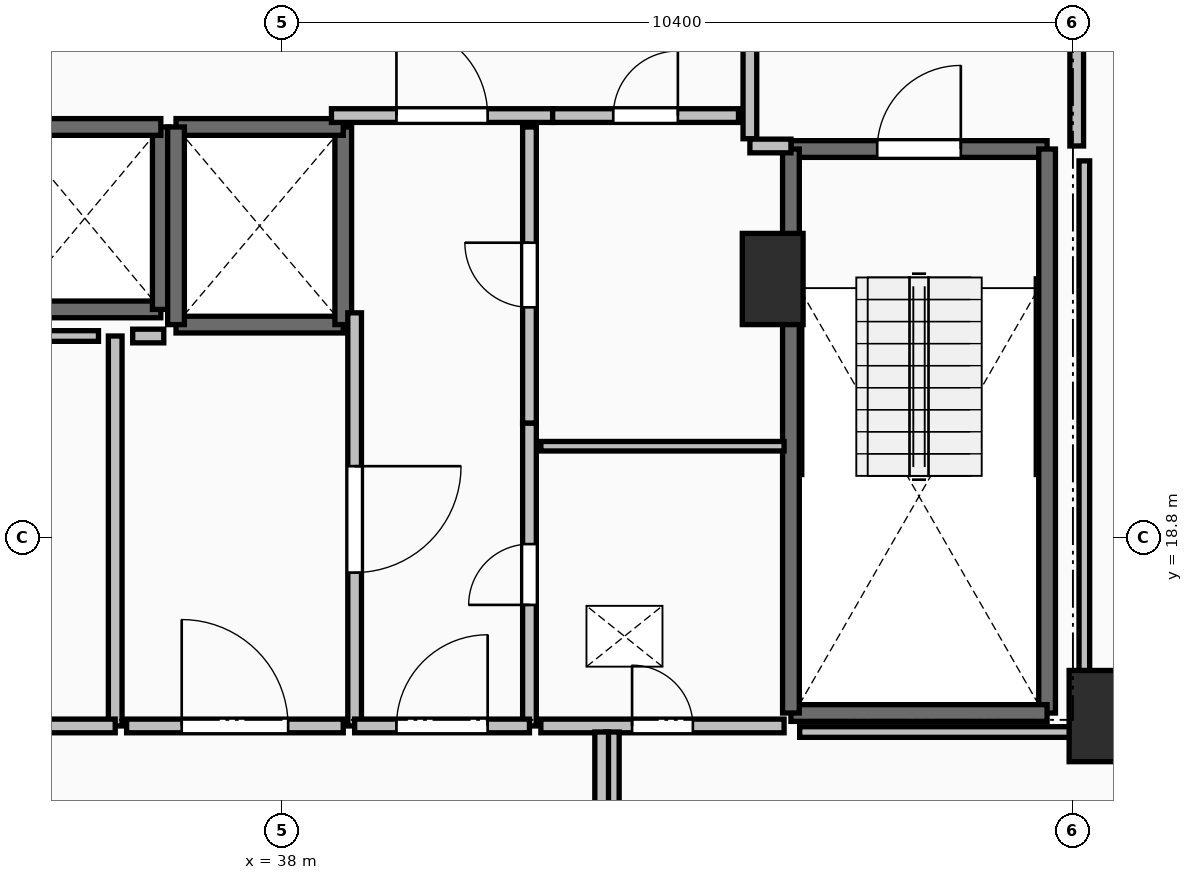
"""IFC4 building model, lengths in metres.
Left out: names, types, materials, properties, quantities, classifications, styles, units other than length and angle.
Written with IfcOpenShell. Run it as: python <this file> out.ifc"""

import sys

from ifc_helpers import new_model, si_unit, direction, frame, frame_2d, origin, origin_2d, place, context, subcontext, project, spatial, rectangle, extrude, element, fill, save


model = new_model("IFC4")
c1 = context("Model", 3, precision=1e-05, world=origin(), true_north=direction((0.0, 1.0)))
c2 = subcontext(c1, "Body", "Model", "MODEL_VIEW")
j1 = project(units=[si_unit("LENGTHUNIT", "METRE"), si_unit("PLANEANGLEUNIT", "RADIAN")], contexts=[c1])
p1 = place(None, origin())
s1 = spatial("IfcSite", under=j1, at=p1, CompositionType="ELEMENT")
p2 = place(p1, origin())
s2 = spatial("IfcBuilding", under=s1, at=p2, CompositionType="ELEMENT")
p3 = place(p2, frame((0.0, 0.0, 24.0)))
s3 = spatial("IfcBuildingStorey", under=s2, at=p3, CompositionType="ELEMENT", Elevation=24.0)
for number, where, z_axis, x_axis in (
    (1, (48.75, 16.45, 0.0), (0.0, 0.0, 1.0), (1.0, 0.0, 0.0)),
    (2, (44.45, 22.2, 0.0), (0.0, 0.0, 1.0), (1.0, 0.0, 0.0)),
):
    element("IfcColumn", number, at=place(p3, frame(where, z_axis=z_axis, x_axis=x_axis)), inside=s3, PredefinedType="PILASTER", context=c2, shape_type="SweptSolid", body=[
        extrude(rectangle(XDim=0.8, YDim=1.2, at=origin_2d()), origin(), (0.0, 0.0, 1.0), 3.5),
    ])
p4 = place(p3, frame((44.69, 23.91, 0.0), z_axis=(0.0, 0.0, 1.0), x_axis=(1.0, 0.0, 0.0)))
e3 = element("IfcWall", 3, at=p4, inside=s3, PredefinedType="SOLIDWALL", context=c2, shape_type="SweptSolid", body=[
    extrude(rectangle(XDim=3.37, YDim=0.22, at=frame_2d((1.685, 0.0))), origin(), (0.0, 0.0, 1.0), 3.24),
])
p5 = place(p4, frame((1.135, 0.0, 0.0)))
e4 = element("IfcOpeningElement", 4, at=p5, cuts=e3, PredefinedType="OPENING", context=c2, shape_type="SweptSolid", body=[
    extrude(rectangle(XDim=1.1, YDim=2.15, at=frame_2d((0.55, 1.075))), frame((0.0, 0.125, 0.0), z_axis=(0.0, -1.0, 0.0), x_axis=(1.0, 0.0, 0.0)), (0.0, 0.0, 1.0), 0.25),
])
p6 = place(p3, frame((48.06, 23.91, 0.0), z_axis=(0.0, 0.0, 1.0), x_axis=(0.0, -1.0, 0.0)))
e5 = element("IfcWall", 5, at=p6, inside=s3, PredefinedType="SOLIDWALL", context=c2, shape_type="SweptSolid", body=[
    extrude(rectangle(XDim=7.42, YDim=0.22, at=frame_2d((3.71, 0.0))), origin(), (0.0, 0.0, 1.0), 3.24),
])
p7 = place(p3, frame((48.06, 16.49, 0.0), z_axis=(0.0, 0.0, 1.0), x_axis=(-1.0, 0.0, 0.0)))
e6 = element("IfcWall", 6, at=p7, inside=s3, PredefinedType="SOLIDWALL", context=c2, shape_type="SweptSolid", body=[
    extrude(rectangle(XDim=3.37, YDim=0.22, at=frame_2d((1.685, 0.0))), origin(), (0.0, 0.0, 1.0), 3.24),
])
p8 = place(p3, frame((44.69, 16.49, 0.0), z_axis=(0.0, 0.0, 1.0), x_axis=(0.0, 1.0, 0.0)))
e7 = element("IfcWall", 7, at=p8, inside=s3, PredefinedType="SOLIDWALL", context=c2, shape_type="SweptSolid", body=[
    extrude(rectangle(XDim=7.42, YDim=0.22, at=frame_2d((3.71, 0.0))), origin(), (0.0, 0.0, 1.0), 3.24),
])
p9 = place(p3, frame((34.4, 21.8, 0.0), z_axis=(0.0, 0.0, 1.0), x_axis=(1.0, 0.0, 0.0)))
e8 = element("IfcWall", 8, at=p9, inside=s3, PredefinedType="SOLIDWALL", context=c2, shape_type="SweptSolid", body=[
    extrude(rectangle(XDim=2.0, YDim=0.22, at=frame_2d((1.0, 0.0))), origin(), (0.0, 0.0, 1.0), 3.24),
])
p10 = place(p3, frame((36.4, 21.8, 0.0), z_axis=(0.0, 0.0, 1.0), x_axis=(0.0, 1.0, 0.0)))
e9 = element("IfcWall", 9, at=p10, inside=s3, PredefinedType="SOLIDWALL", context=c2, shape_type="SweptSolid", body=[
    extrude(rectangle(XDim=2.4, YDim=0.22, at=frame_2d((1.2, 0.0))), origin(), (0.0, 0.0, 1.0), 3.24),
])
p11 = place(p3, frame((36.4, 24.2, 0.0), z_axis=(0.0, 0.0, 1.0), x_axis=(-1.0, 0.0, 0.0)))
e10 = element("IfcWall", 10, at=p11, inside=s3, PredefinedType="SOLIDWALL", context=c2, shape_type="SweptSolid", body=[
    extrude(rectangle(XDim=2.0, YDim=0.22, at=frame_2d((1.0, 0.0))), origin(), (0.0, 0.0, 1.0), 3.24),
])
p12 = place(p3, frame((36.6, 21.6, 0.0), z_axis=(0.0, 0.0, 1.0), x_axis=(1.0, 0.0, 0.0)))
e11 = element("IfcWall", 11, at=p12, inside=s3, PredefinedType="SOLIDWALL", context=c2, shape_type="SweptSolid", body=[
    extrude(rectangle(XDim=2.2, YDim=0.22, at=frame_2d((1.1, 0.0))), origin(), (0.0, 0.0, 1.0), 3.24),
])
p13 = place(p3, frame((38.8, 21.6, 0.0), z_axis=(0.0, 0.0, 1.0), x_axis=(0.0, 1.0, 0.0)))
e12 = element("IfcWall", 12, at=p13, inside=s3, PredefinedType="SOLIDWALL", context=c2, shape_type="SweptSolid", body=[
    extrude(rectangle(XDim=2.6, YDim=0.22, at=frame_2d((1.3, 0.0))), origin(), (0.0, 0.0, 1.0), 3.24),
])
p14 = place(p3, frame((38.8, 24.2, 0.0), z_axis=(0.0, 0.0, 1.0), x_axis=(-1.0, 0.0, 0.0)))
e13 = element("IfcWall", 13, at=p14, inside=s3, PredefinedType="SOLIDWALL", context=c2, shape_type="SweptSolid", body=[
    extrude(rectangle(XDim=2.2, YDim=0.22, at=frame_2d((1.1, 0.0))), origin(), (0.0, 0.0, 1.0), 3.24),
])
p15 = place(p3, frame((36.6, 24.2, 0.0), z_axis=(0.0, 0.0, 1.0), x_axis=(0.0, -1.0, 0.0)))
e14 = element("IfcWall", 14, at=p15, inside=s3, PredefinedType="SOLIDWALL", context=c2, shape_type="SweptSolid", body=[
    extrude(rectangle(XDim=2.6, YDim=0.22, at=frame_2d((1.3, 0.0))), origin(), (0.0, 0.0, 1.0), 3.24),
])
p16 = place(p3, frame((44.15, 27.955, 0.0), z_axis=(0.0, 0.0, 1.0), x_axis=(0.0, -1.0, 0.0)))
e15 = element("IfcWall", 15, at=p16, inside=s3, PredefinedType="PARTITIONING", context=c2, shape_type="SweptSolid", body=[
    extrude(rectangle(XDim=3.91, YDim=0.18, at=frame_2d((1.955, 0.0))), origin(), (0.0, 0.0, 1.0), 3.24),
])
p17 = place(p16, frame((1.355, 0.0, 0.0)))
e16 = element("IfcOpeningElement", 16, at=p17, cuts=e15, PredefinedType="OPENING", context=c2, shape_type="SweptSolid", body=[
    extrude(rectangle(XDim=1.2, YDim=2.15, at=frame_2d((0.6, 1.075))), frame((0.0, 0.105, 0.0), z_axis=(0.0, -1.0, 0.0), x_axis=(1.0, 0.0, 0.0)), (0.0, 0.0, 1.0), 0.21),
])
p18 = place(p3, frame((44.15, 23.95, 0.0), z_axis=(0.0, 0.0, 1.0), x_axis=(1.0, 0.0, 0.0)))
e17 = element("IfcWall", 17, at=p18, inside=s3, PredefinedType="PARTITIONING", context=c2, shape_type="SweptSolid", body=[
    extrude(rectangle(XDim=0.54, YDim=0.18, at=frame_2d((0.27, 0.0))), origin(), (0.0, 0.0, 1.0), 3.24),
])
p19 = place(p3, frame((48.45, 23.95, 0.0), z_axis=(0.0, 0.0, 1.0), x_axis=(0.0, 1.0, 0.0)))
e18 = element("IfcWall", 18, at=p19, inside=s3, PredefinedType="PARTITIONING", context=c2, shape_type="SweptSolid", body=[
    extrude(rectangle(XDim=4.05, YDim=0.18, at=frame_2d((2.025, 0.0))), origin(), (0.0, 0.0, 1.0), 3.24),
])
p20 = place(p19, frame((1.425, 0.0, 0.0)))
e19 = element("IfcOpeningElement", 19, at=p20, cuts=e18, PredefinedType="OPENING", context=c2, shape_type="SweptSolid", body=[
    extrude(rectangle(XDim=1.2, YDim=2.15, at=frame_2d((0.6, 1.075))), frame((0.0, 0.105, 0.0), z_axis=(0.0, -1.0, 0.0), x_axis=(1.0, 0.0, 0.0)), (0.0, 0.0, 1.0), 0.21),
])
p21 = place(p3, frame((38.645, 24.35, 0.0), z_axis=(0.0, 0.0, 1.0), x_axis=(1.0, 0.0, 0.0)))
e20 = element("IfcWall", 20, at=p21, inside=s3, PredefinedType="PARTITIONING", context=c2, shape_type="SweptSolid", body=[
    extrude(rectangle(XDim=2.91, YDim=0.18, at=frame_2d((1.455, 0.0))), origin(), (0.0, 0.0, 1.0), 3.24),
])
p22 = place(p21, frame((0.855, 0.0, 0.0)))
e21 = element("IfcOpeningElement", 21, at=p22, cuts=e20, PredefinedType="OPENING", context=c2, shape_type="SweptSolid", body=[
    extrude(rectangle(XDim=1.2, YDim=2.15, at=frame_2d((0.6, 1.075))), frame((0.0, 0.105, 0.0), z_axis=(0.0, -1.0, 0.0), x_axis=(1.0, 0.0, 0.0)), (0.0, 0.0, 1.0), 0.21),
])
p23 = place(p3, frame((41.555, 24.35, 0.0), z_axis=(0.0, 0.0, 1.0), x_axis=(1.0, 0.0, 0.0)))
e22 = element("IfcWall", 22, at=p23, inside=s3, PredefinedType="PARTITIONING", context=c2, shape_type="SweptSolid", body=[
    extrude(rectangle(XDim=2.445, YDim=0.18, at=frame_2d((1.223, 0.0))), origin(), (0.0, 0.0, 1.0), 3.24),
])
p24 = place(p23, frame((0.798, 0.0, 0.0)))
e23 = element("IfcOpeningElement", 23, at=p24, cuts=e22, PredefinedType="OPENING", context=c2, shape_type="SweptSolid", body=[
    extrude(rectangle(XDim=0.85, YDim=2.1, at=frame_2d((0.425, 1.05))), frame((0.0, 0.105, 0.0), z_axis=(0.0, -1.0, 0.0), x_axis=(1.0, 0.0, 0.0)), (0.0, 0.0, 1.0), 0.21),
])
p25 = place(p3, frame((41.25, 16.32, 0.0), z_axis=(0.0, 0.0, 1.0), x_axis=(0.0, 1.0, 0.0)))
e24 = element("IfcWall", 24, at=p25, inside=s3, PredefinedType="PARTITIONING", context=c2, shape_type="SweptSolid", body=[
    extrude(rectangle(XDim=3.985, YDim=0.18, at=frame_2d((1.992, 0.0))), origin(), (0.0, 0.0, 1.0), 3.24),
])
p26 = place(p25, frame((1.593, 0.0, 0.0)))
e25 = element("IfcOpeningElement", 25, at=p26, cuts=e24, PredefinedType="OPENING", context=c2, shape_type="SweptSolid", body=[
    extrude(rectangle(XDim=0.8, YDim=2.05, at=frame_2d((0.4, 1.025))), frame((0.0, 0.105, 0.0), z_axis=(0.0, -1.0, 0.0), x_axis=(1.0, 0.0, 0.0)), (0.0, 0.0, 1.0), 0.21),
])
p27 = place(p3, frame((41.25, 20.305, 0.0), z_axis=(0.0, 0.0, 1.0), x_axis=(0.0, 1.0, 0.0)))
e26 = element("IfcWall", 26, at=p27, inside=s3, PredefinedType="PARTITIONING", context=c2, shape_type="SweptSolid", body=[
    extrude(rectangle(XDim=3.895, YDim=0.18, at=frame_2d((1.948, 0.0))), origin(), (0.0, 0.0, 1.0), 3.24),
])
p28 = place(p27, frame((1.522, 0.0, 0.0)))
e27 = element("IfcOpeningElement", 27, at=p28, cuts=e26, PredefinedType="OPENING", context=c2, shape_type="SweptSolid", body=[
    extrude(rectangle(XDim=0.85, YDim=2.1, at=frame_2d((0.425, 1.05))), frame((0.0, 0.105, 0.0), z_axis=(0.0, -1.0, 0.0), x_axis=(1.0, 0.0, 0.0)), (0.0, 0.0, 1.0), 0.21),
])
p29 = place(p3, frame((38.95, 21.755, 0.0), z_axis=(0.0, 0.0, 1.0), x_axis=(0.0, -1.0, 0.0)))
e28 = element("IfcWall", 28, at=p29, inside=s3, PredefinedType="PARTITIONING", context=c2, shape_type="SweptSolid", body=[
    extrude(rectangle(XDim=5.435, YDim=0.18, at=frame_2d((2.717, 0.0))), origin(), (0.0, 0.0, 1.0), 3.24),
])
p30 = place(p29, frame((2.018, 0.0, 0.0)))
e29 = element("IfcOpeningElement", 29, at=p30, cuts=e28, PredefinedType="OPENING", context=c2, shape_type="SweptSolid", body=[
    extrude(rectangle(XDim=1.4, YDim=2.2, at=frame_2d((0.7, 1.1))), frame((0.0, 0.105, 0.0), z_axis=(0.0, -1.0, 0.0), x_axis=(1.0, 0.0, 0.0)), (0.0, 0.0, 1.0), 0.21),
])
p31 = place(p3, frame((38.95, 16.32, 0.0), z_axis=(0.0, 0.0, 1.0), x_axis=(1.0, 0.0, 0.0)))
e30 = element("IfcWall", 30, at=p31, inside=s3, PredefinedType="PARTITIONING", context=c2, shape_type="SweptSolid", body=[
    extrude(rectangle(XDim=2.3, YDim=0.18, at=frame_2d((1.15, 0.0))), origin(), (0.0, 0.0, 1.0), 3.24),
])
p32 = place(p31, frame((0.55, 0.0, 0.0)))
e31 = element("IfcOpeningElement", 31, at=p32, cuts=e30, PredefinedType="OPENING", context=c2, shape_type="SweptSolid", body=[
    extrude(rectangle(XDim=1.2, YDim=2.15, at=frame_2d((0.6, 1.075))), frame((0.0, 0.105, 0.0), z_axis=(0.0, -1.0, 0.0), x_axis=(1.0, 0.0, 0.0)), (0.0, 0.0, 1.0), 0.21),
])
p33 = place(p3, frame((44.6, 20.0, 0.0), z_axis=(0.0, 0.0, 1.0), x_axis=(-1.0, 0.0, 0.0)))
e32 = element("IfcWall", 32, at=p33, inside=s3, PredefinedType="PARTITIONING", context=c2, shape_type="SweptSolid", body=[
    extrude(rectangle(XDim=3.2, YDim=0.125, at=frame_2d((1.6, 0.0))), origin(), (0.0, 0.0, 1.0), 3.24),
])
p34 = place(p3, frame((41.4, 16.32, 0.0), z_axis=(0.0, 0.0, 1.0), x_axis=(1.0, 0.0, 0.0)))
e33 = element("IfcWall", 33, at=p34, inside=s3, PredefinedType="PARTITIONING", context=c2, shape_type="SweptSolid", body=[
    extrude(rectangle(XDim=3.2, YDim=0.18, at=frame_2d((1.6, 0.0))), origin(), (0.0, 0.0, 1.0), 3.24),
])
p35 = place(p34, frame((1.2, 0.0, 0.0)))
e34 = element("IfcOpeningElement", 34, at=p35, cuts=e33, PredefinedType="OPENING", context=c2, shape_type="SweptSolid", body=[
    extrude(rectangle(XDim=0.8, YDim=2.05, at=frame_2d((0.4, 1.025))), frame((0.0, 0.105, 0.0), z_axis=(0.0, -1.0, 0.0), x_axis=(1.0, 0.0, 0.0)), (0.0, 0.0, 1.0), 0.21),
])
p36 = place(p3, frame((35.8, 16.32, 0.0), z_axis=(0.0, 0.0, 1.0), x_axis=(0.0, 1.0, 0.0)))
e35 = element("IfcWall", 35, at=p36, inside=s3, PredefinedType="PARTITIONING", context=c2, shape_type="SweptSolid", body=[
    extrude(rectangle(XDim=5.13, YDim=0.18, at=frame_2d((2.565, 0.0))), origin(), (0.0, 0.0, 1.0), 3.24),
])
p37 = place(p3, frame((31.4, 16.32, 0.0), z_axis=(0.0, 0.0, 1.0), x_axis=(1.0, 0.0, 0.0)))
e36 = element("IfcWall", 36, at=p37, inside=s3, PredefinedType="PARTITIONING", context=c2, shape_type="SweptSolid", body=[
    extrude(rectangle(XDim=4.4, YDim=0.18, at=frame_2d((2.2, 0.0))), origin(), (0.0, 0.0, 1.0), 3.24),
])
p38 = place(p37, frame((1.775, 0.0, 0.0)))
e37 = element("IfcOpeningElement", 37, at=p38, cuts=e36, PredefinedType="OPENING", context=c2, shape_type="SweptSolid", body=[
    extrude(rectangle(XDim=0.85, YDim=2.1, at=frame_2d((0.425, 1.05))), frame((0.0, 0.105, 0.0), z_axis=(0.0, -1.0, 0.0), x_axis=(1.0, 0.0, 0.0)), (0.0, 0.0, 1.0), 0.21),
])
p39 = place(p3, frame((35.95, 16.32, 0.0), z_axis=(0.0, 0.0, 1.0), x_axis=(1.0, 0.0, 0.0)))
e38 = element("IfcWall", 38, at=p39, inside=s3, PredefinedType="PARTITIONING", context=c2, shape_type="SweptSolid", body=[
    extrude(rectangle(XDim=2.85, YDim=0.18, at=frame_2d((1.425, 0.0))), origin(), (0.0, 0.0, 1.0), 3.24),
])
p40 = place(p39, frame((0.725, 0.0, 0.0)))
e39 = element("IfcOpeningElement", 39, at=p40, cuts=e38, PredefinedType="OPENING", context=c2, shape_type="SweptSolid", body=[
    extrude(rectangle(XDim=1.4, YDim=2.2, at=frame_2d((0.7, 1.1))), frame((0.0, 0.105, 0.0), z_axis=(0.0, -1.0, 0.0), x_axis=(1.0, 0.0, 0.0)), (0.0, 0.0, 1.0), 0.21),
])
p41 = place(p3, frame((42.34, 16.24, 0.0), z_axis=(0.0, 0.0, 1.0), x_axis=(0.0, -1.0, 0.0)))
e40 = element("IfcWall", 40, at=p41, inside=s3, PredefinedType="PARTITIONING", context=c2, shape_type="SweptSolid", body=[
    extrude(rectangle(XDim=2.14, YDim=0.18, at=frame_2d((1.07, 0.0))), origin(), (0.0, 0.0, 1.0), 3.24),
])
p42 = place(p3, frame((42.2, 14.157, 0.0), z_axis=(0.0, 0.0, 1.0), x_axis=(0.0, 1.0, 0.0)))
e41 = element("IfcWall", 41, at=p42, inside=s3, PredefinedType="PARTITIONING", context=c2, shape_type="SweptSolid", body=[
    extrude(rectangle(XDim=2.083, YDim=0.18, at=frame_2d((1.042, 0.0))), origin(), (0.0, 0.0, 1.0), 3.24),
])
p43 = place(p3, frame((35.58, 21.45, 0.0), z_axis=(0.0, 0.0, 1.0), x_axis=(-1.0, 0.0, 0.0)))
e42 = element("IfcWall", 42, at=p43, inside=s3, PredefinedType="PARTITIONING", context=c2, shape_type="SweptSolid", body=[
    extrude(rectangle(XDim=4.05, YDim=0.14, at=frame_2d((2.025, 0.0))), origin(), (0.0, 0.0, 1.0), 3.24),
])
p44 = place(p3, frame((36.439, 21.45, 0.0), z_axis=(0.0, 0.0, 1.0), x_axis=(-1.0, 0.0, 0.0)))
e43 = element("IfcWall", 43, at=p44, inside=s3, PredefinedType="PARTITIONING", context=c2, shape_type="SweptSolid", body=[
    extrude(rectangle(XDim=0.409, YDim=0.18, at=frame_2d((0.205, 0.0))), origin(), (0.0, 0.0, 1.0), 3.24),
])
p45 = place(p3, frame((48.55, 23.754, 0.0), z_axis=(0.0, 0.0, 1.0), x_axis=(0.0, -1.0, 0.0)))
e44 = element("IfcWall", 44, at=p45, inside=s3, PredefinedType="PARTITIONING", context=c2, shape_type="SweptSolid", body=[
    extrude(rectangle(XDim=7.514, YDim=0.14, at=frame_2d((3.757, 0.0))), origin(), (0.0, 0.0, 1.0), 2.432),
])
p46 = place(p3, frame((48.55, 16.24, 0.0), z_axis=(0.0, 0.0, 1.0), x_axis=(-1.0, 0.0, 0.0)))
e45 = element("IfcWall", 45, at=p46, inside=s3, PredefinedType="PARTITIONING", context=c2, shape_type="SweptSolid", body=[
    extrude(rectangle(XDim=3.745, YDim=0.14, at=frame_2d((1.873, 0.0))), origin(), (0.0, 0.0, 1.0), 2.432),
])
p47 = place(p5, origin())
e46 = element("IfcDoor", 46, at=p47, inside=s3, OperationType="SINGLE_SWING_RIGHT", PredefinedType="DOOR", context=c2, shape_type="SweptSolid", body=[
    extrude(rectangle(XDim=1.1, YDim=2.15, at=frame_2d((0.55, 1.075))), frame((0.0, 0.025, 0.0), z_axis=(0.0, -1.0, 0.0), x_axis=(1.0, 0.0, 0.0)), (0.0, 0.0, 1.0), 0.05),
])
fill(e4, e46)
p48 = place(p22, origin())
e47 = element("IfcDoor", 47, at=p48, inside=s3, OperationType="SINGLE_SWING_LEFT", PredefinedType="DOOR", context=c2, shape_type="SweptSolid", body=[
    extrude(rectangle(XDim=1.2, YDim=2.15, at=frame_2d((0.6, 1.075))), frame((0.0, 0.025, 0.0), z_axis=(0.0, -1.0, 0.0), x_axis=(1.0, 0.0, 0.0)), (0.0, 0.0, 1.0), 0.05),
])
fill(e21, e47)
p49 = place(p24, origin())
e48 = element("IfcDoor", 48, at=p49, inside=s3, OperationType="SINGLE_SWING_RIGHT", PredefinedType="DOOR", context=c2, shape_type="SweptSolid", body=[
    extrude(rectangle(XDim=0.85, YDim=2.1, at=frame_2d((0.425, 1.05))), frame((0.0, 0.025, 0.0), z_axis=(0.0, -1.0, 0.0), x_axis=(1.0, 0.0, 0.0)), (0.0, 0.0, 1.0), 0.05),
])
fill(e23, e48)
p50 = place(p26, origin())
e49 = element("IfcDoor", 49, at=p50, inside=s3, OperationType="SINGLE_SWING_LEFT", PredefinedType="DOOR", context=c2, shape_type="SweptSolid", body=[
    extrude(rectangle(XDim=0.8, YDim=2.05, at=frame_2d((0.4, 1.025))), frame((0.0, 0.025, 0.0), z_axis=(0.0, -1.0, 0.0), x_axis=(1.0, 0.0, 0.0)), (0.0, 0.0, 1.0), 0.05),
])
fill(e25, e49)
p51 = place(p28, origin())
e50 = element("IfcDoor", 50, at=p51, inside=s3, OperationType="SINGLE_SWING_RIGHT", PredefinedType="DOOR", context=c2, shape_type="SweptSolid", body=[
    extrude(rectangle(XDim=0.85, YDim=2.1, at=frame_2d((0.425, 1.05))), frame((0.0, 0.025, 0.0), z_axis=(0.0, -1.0, 0.0), x_axis=(1.0, 0.0, 0.0)), (0.0, 0.0, 1.0), 0.05),
])
fill(e27, e50)
p52 = place(p30, origin())
e51 = element("IfcDoor", 51, at=p52, inside=s3, OperationType="DOUBLE_SWING_LEFT", PredefinedType="DOOR", context=c2, shape_type="SweptSolid", body=[
    extrude(rectangle(XDim=1.4, YDim=2.2, at=frame_2d((0.7, 1.1))), frame((0.0, 0.025, 0.0), z_axis=(0.0, -1.0, 0.0), x_axis=(1.0, 0.0, 0.0)), (0.0, 0.0, 1.0), 0.05),
])
fill(e29, e51)
p53 = place(p32, origin())
e52 = element("IfcDoor", 52, at=p53, inside=s3, OperationType="SINGLE_SWING_RIGHT", PredefinedType="DOOR", context=c2, shape_type="SweptSolid", body=[
    extrude(rectangle(XDim=1.2, YDim=2.15, at=frame_2d((0.6, 1.075))), frame((0.0, 0.025, 0.0), z_axis=(0.0, -1.0, 0.0), x_axis=(1.0, 0.0, 0.0)), (0.0, 0.0, 1.0), 0.05),
])
fill(e31, e52)
p54 = place(p35, origin())
e53 = element("IfcDoor", 53, at=p54, inside=s3, OperationType="SINGLE_SWING_LEFT", PredefinedType="DOOR", context=c2, shape_type="SweptSolid", body=[
    extrude(rectangle(XDim=0.8, YDim=2.05, at=frame_2d((0.4, 1.025))), frame((0.0, 0.025, 0.0), z_axis=(0.0, -1.0, 0.0), x_axis=(1.0, 0.0, 0.0)), (0.0, 0.0, 1.0), 0.05),
])
fill(e34, e53)
p55 = place(p40, origin())
e54 = element("IfcDoor", 54, at=p55, inside=s3, OperationType="DOUBLE_SWING_LEFT", PredefinedType="DOOR", context=c2, shape_type="SweptSolid", body=[
    extrude(rectangle(XDim=1.4, YDim=2.2, at=frame_2d((0.7, 1.1))), frame((0.0, 0.025, 0.0), z_axis=(0.0, -1.0, 0.0), x_axis=(1.0, 0.0, 0.0)), (0.0, 0.0, 1.0), 0.05),
])
fill(e39, e54)
save(model, sys.argv[1])
